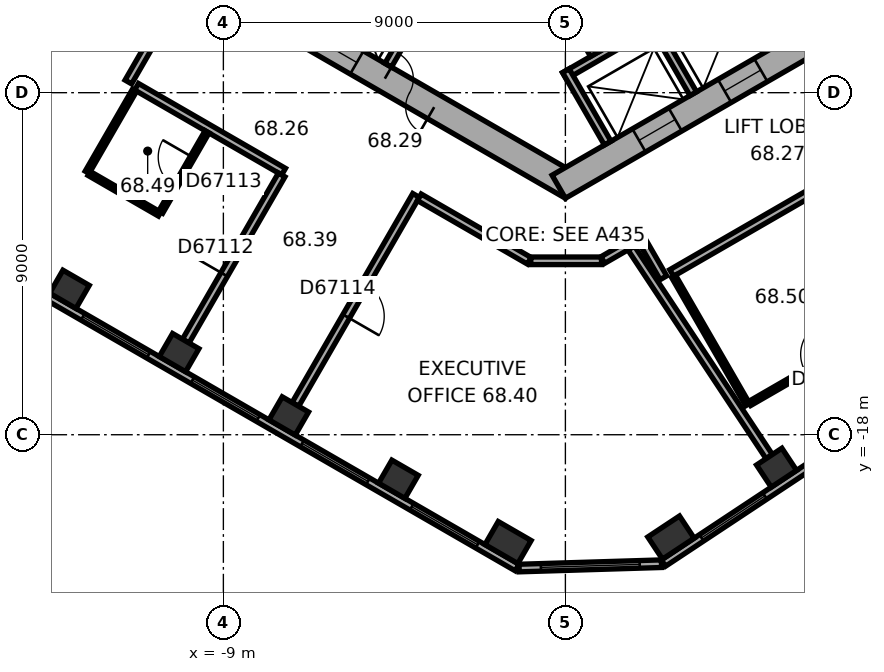
"""IFC4 building model, lengths in metres.
Left out: names, types, materials, properties, quantities, classifications, styles, units other than length and angle.
Written with IfcOpenShell. Run it as: python <this file> out.ifc"""

import sys

from ifc_helpers import new_model, si_unit, direction, frame, frame_2d, origin, origin_2d, place, context, subcontext, project, spatial, rectangle, extrude, element, fill, save


model = new_model("IFC4")
c1 = context("Model", 3, precision=1e-05, world=origin(), true_north=direction((0.0, 1.0)))
c2 = subcontext(c1, "Body", "Model", "MODEL_VIEW")
j1 = project(units=[si_unit("LENGTHUNIT", "METRE"), si_unit("PLANEANGLEUNIT", "RADIAN")], contexts=[c1])
p1 = place(None, origin())
s1 = spatial("IfcSite", under=j1, at=p1, CompositionType="ELEMENT")
p2 = place(p1, origin())
s2 = spatial("IfcBuilding", under=s1, at=p2, CompositionType="ELEMENT")
p3 = place(p2, frame((0.0, 0.0, 274.6)))
s3 = spatial("IfcBuildingStorey", under=s2, at=p3, CompositionType="ELEMENT", Elevation=274.6)
for number, where, z_axis, x_axis in (
    (1, (-13.05, -14.174, 0.0), (0.0, 0.0, 1.0), (0.866, -0.5, 0.0)),
    (2, (-10.165, -15.84, 0.0), (0.0, 0.0, 1.0), (0.866, -0.5, 0.0)),
    (3, (-7.28, -17.505, 0.0), (0.0, 0.0, 1.0), (0.866, -0.5, 0.0)),
    (4, (-4.395, -19.171, 0.0), (0.0, 0.0, 1.0), (0.866, -0.5, 0.0)),
):
    element("IfcColumn", number, at=place(p3, frame(where, z_axis=z_axis, x_axis=x_axis)), inside=s3, PredefinedType="COLUMN", context=c2, shape_type="SweptSolid", body=[
        extrude(rectangle(XDim=0.8, YDim=0.7, at=origin_2d()), origin(), (0.0, 0.0, 1.0), 3.7),
    ])
for number, where, z_axis, x_axis in (
    (5, (-1.509, -20.837, 0.0), (0.0, 0.0, 1.0), (0.866, -0.5, 0.0)),
    (6, (2.778, -20.706, 0.0), (0.0, 0.0, 1.0), (0.834, 0.552, 0.0)),
):
    element("IfcColumn", number, at=place(p3, frame(where, z_axis=z_axis, x_axis=x_axis)), inside=s3, PredefinedType="COLUMN", context=c2, shape_type="SweptSolid", body=[
        extrude(rectangle(XDim=1.0, YDim=0.7, at=origin_2d()), origin(), (0.0, 0.0, 1.0), 3.7),
    ])
p4 = place(p3, frame((5.557, -18.867, 0.0), z_axis=(0.0, 0.0, 1.0), x_axis=(0.833885822067, 0.551936985312, 0.0)))
e7 = element("IfcColumn", 7, at=p4, inside=s3, PredefinedType="COLUMN", context=c2, shape_type="SweptSolid", body=[
    extrude(rectangle(XDim=0.8, YDim=0.7, at=origin_2d()), origin(), (0.0, 0.0, 1.0), 3.7),
])
p5 = place(p3, frame((-10.025, -5.586, 0.0), z_axis=(0.0, 0.0, 1.0), x_axis=(0.866026453023, -0.499998182661, 0.0)))
e8 = element("IfcWall", 8, at=p5, inside=s3, PredefinedType="SHEAR", context=c2, shape_type="SweptSolid", body=[
    extrude(rectangle(XDim=11.778, YDim=0.7, at=frame_2d((5.889, 0.0))), origin(), (0.0, 0.0, 1.0), 3.7),
])
p6 = place(p5, frame((6.089, 0.0, 0.0)))
e9 = element("IfcOpeningElement", 9, at=p6, cuts=e8, PredefinedType="OPENING", context=c2, shape_type="SweptSolid", body=[
    extrude(rectangle(XDim=1.5, YDim=2.1, at=frame_2d((0.75, 1.05))), frame((0.0, 0.36, 0.0), z_axis=(0.0, -1.0, 0.0), x_axis=(1.0, 0.0, 0.0)), (0.0, 0.0, 1.0), 0.72),
])
p7 = place(p5, frame((1.539, 0.0, 0.0)))
e10 = element("IfcOpeningElement", 10, at=p7, cuts=e8, PredefinedType="OPENING", context=c2, shape_type="SweptSolid", body=[
    extrude(rectangle(XDim=1.1, YDim=2.1, at=frame_2d((0.55, 1.05))), frame((0.0, 0.36, 0.0), z_axis=(0.0, -1.0, 0.0), x_axis=(1.0, 0.0, 0.0)), (0.0, 0.0, 1.0), 0.72),
])
p8 = place(p5, frame((4.139, 0.0, 0.0)))
e11 = element("IfcOpeningElement", 11, at=p8, cuts=e8, PredefinedType="OPENING", context=c2, shape_type="SweptSolid", body=[
    extrude(rectangle(XDim=1.1, YDim=2.1, at=frame_2d((0.55, 1.05))), frame((0.0, 0.36, 0.0), z_axis=(0.0, -1.0, 0.0), x_axis=(1.0, 0.0, 0.0)), (0.0, 0.0, 1.0), 0.72),
])
p9 = place(p3, frame((-0.175, -11.475, 0.0), z_axis=(0.0, 0.0, 1.0), x_axis=(0.866026453023, 0.499998182661, 0.0)))
e12 = element("IfcWall", 12, at=p9, inside=s3, PredefinedType="SHEAR", context=c2, shape_type="SweptSolid", body=[
    extrude(rectangle(XDim=11.778, YDim=0.7, at=frame_2d((5.889, 0.0))), origin(), (0.0, 0.0, 1.0), 3.7),
])
p10 = place(p9, frame((2.439, 0.0, 0.0)))
e13 = element("IfcOpeningElement", 13, at=p10, cuts=e12, PredefinedType="OPENING", context=c2, shape_type="SweptSolid", body=[
    extrude(rectangle(XDim=1.1, YDim=2.1, at=frame_2d((0.55, 1.05))), frame((0.0, 0.36, 0.0), z_axis=(0.0, -1.0, 0.0), x_axis=(1.0, 0.0, 0.0)), (0.0, 0.0, 1.0), 0.72),
])
p11 = place(p9, frame((5.039, 0.0, 0.0)))
e14 = element("IfcOpeningElement", 14, at=p11, cuts=e12, PredefinedType="OPENING", context=c2, shape_type="SweptSolid", body=[
    extrude(rectangle(XDim=1.1, YDim=2.1, at=frame_2d((0.55, 1.05))), frame((0.0, 0.36, 0.0), z_axis=(0.0, -1.0, 0.0), x_axis=(1.0, 0.0, 0.0)), (0.0, 0.0, 1.0), 0.72),
])
p12 = place(p9, frame((7.639, 0.0, 0.0)))
e15 = element("IfcOpeningElement", 15, at=p12, cuts=e12, PredefinedType="OPENING", context=c2, shape_type="SweptSolid", body=[
    extrude(rectangle(XDim=1.1, YDim=2.1, at=frame_2d((0.55, 1.05))), frame((0.0, 0.36, 0.0), z_axis=(0.0, -1.0, 0.0), x_axis=(1.0, 0.0, 0.0)), (0.0, 0.0, 1.0), 0.72),
])
p13 = place(p3, frame((-16.626, -12.629, 0.0), z_axis=(0.0, 0.0, 1.0), x_axis=(0.866026460444, -0.499998169808, 0.0)))
e16 = element("IfcWall", 16, at=p13, inside=s3, PredefinedType="STANDARD", context=c2, shape_type="SweptSolid", body=[
    extrude(rectangle(XDim=17.731, YDim=0.2, at=frame_2d((8.866, 0.0))), origin(), (0.0, 0.0, 1.0), 3.7),
])
p14 = place(p13, frame((1.203, 0.0, 0.9)))
e17 = element("IfcOpeningElement", 17, at=p14, cuts=e16, PredefinedType="OPENING", context=c2, shape_type="SweptSolid", body=[
    extrude(rectangle(XDim=2.0, YDim=2.0, at=frame_2d((1.0, 1.0))), frame((0.0, 0.11, 0.0), z_axis=(0.0, -1.0, 0.0), x_axis=(1.0, 0.0, 0.0)), (0.0, 0.0, 1.0), 0.22),
])
p15 = place(p13, frame((4.535, 0.0, 0.9)))
e18 = element("IfcOpeningElement", 18, at=p15, cuts=e16, PredefinedType="OPENING", context=c2, shape_type="SweptSolid", body=[
    extrude(rectangle(XDim=2.0, YDim=2.0, at=frame_2d((1.0, 1.0))), frame((0.0, 0.11, 0.0), z_axis=(0.0, -1.0, 0.0), x_axis=(1.0, 0.0, 0.0)), (0.0, 0.0, 1.0), 0.22),
])
p16 = place(p13, frame((7.867, 0.0, 0.9)))
e19 = element("IfcOpeningElement", 19, at=p16, cuts=e16, PredefinedType="OPENING", context=c2, shape_type="SweptSolid", body=[
    extrude(rectangle(XDim=2.0, YDim=2.0, at=frame_2d((1.0, 1.0))), frame((0.0, 0.11, 0.0), z_axis=(0.0, -1.0, 0.0), x_axis=(1.0, 0.0, 0.0)), (0.0, 0.0, 1.0), 0.22),
])
p17 = place(p13, frame((11.198, 0.0, 0.9)))
e20 = element("IfcOpeningElement", 20, at=p17, cuts=e16, PredefinedType="OPENING", context=c2, shape_type="SweptSolid", body=[
    extrude(rectangle(XDim=2.0, YDim=2.0, at=frame_2d((1.0, 1.0))), frame((0.0, 0.11, 0.0), z_axis=(0.0, -1.0, 0.0), x_axis=(1.0, 0.0, 0.0)), (0.0, 0.0, 1.0), 0.22),
])
p18 = place(p13, frame((14.53, 0.0, 0.9)))
e21 = element("IfcOpeningElement", 21, at=p18, cuts=e16, PredefinedType="OPENING", context=c2, shape_type="SweptSolid", body=[
    extrude(rectangle(XDim=2.0, YDim=2.0, at=frame_2d((1.0, 1.0))), frame((0.0, 0.11, 0.0), z_axis=(0.0, -1.0, 0.0), x_axis=(1.0, 0.0, 0.0)), (0.0, 0.0, 1.0), 0.22),
])
p19 = place(p3, frame((-1.217, -21.508, 0.0), z_axis=(0.0, 0.0, 1.0), x_axis=(0.99953295295, 0.030559384285, 0.0)))
e22 = element("IfcWall", 22, at=p19, inside=s3, PredefinedType="STANDARD", context=c2, shape_type="SweptSolid", body=[
    extrude(rectangle(XDim=3.747, YDim=0.2, at=frame_2d((1.874, 0.0))), origin(), (0.0, 0.0, 1.0), 3.7),
])
p20 = place(p19, frame((0.573, 0.0, 0.9)))
e23 = element("IfcOpeningElement", 23, at=p20, cuts=e22, PredefinedType="OPENING", context=c2, shape_type="SweptSolid", body=[
    extrude(rectangle(XDim=2.6, YDim=2.0, at=frame_2d((1.3, 1.0))), frame((0.0, 0.11, 0.0), z_axis=(0.0, -1.0, 0.0), x_axis=(1.0, 0.0, 0.0)), (0.0, 0.0, 1.0), 0.22),
])
p21 = place(p3, frame((2.58, -21.377, 0.0), z_axis=(0.0, 0.0, 1.0), x_axis=(0.833888592176, 0.551932800112, 0.0)))
e24 = element("IfcWall", 24, at=p21, inside=s3, PredefinedType="STANDARD", context=c2, shape_type="SweptSolid", body=[
    extrude(rectangle(XDim=17.731, YDim=0.2, at=frame_2d((8.866, 0.0))), origin(), (0.0, 0.0, 1.0), 3.7),
])
p22 = place(p21, frame((1.202, 0.0, 0.9)))
e25 = element("IfcOpeningElement", 25, at=p22, cuts=e24, PredefinedType="OPENING", context=c2, shape_type="SweptSolid", body=[
    extrude(rectangle(XDim=2.0, YDim=2.0, at=frame_2d((1.0, 1.0))), frame((0.0, 0.11, 0.0), z_axis=(0.0, -1.0, 0.0), x_axis=(1.0, 0.0, 0.0)), (0.0, 0.0, 1.0), 0.22),
])
p23 = place(p21, frame((4.533, 0.0, 0.9)))
e26 = element("IfcOpeningElement", 26, at=p23, cuts=e24, PredefinedType="OPENING", context=c2, shape_type="SweptSolid", body=[
    extrude(rectangle(XDim=2.0, YDim=2.0, at=frame_2d((1.0, 1.0))), frame((0.0, 0.11, 0.0), z_axis=(0.0, -1.0, 0.0), x_axis=(1.0, 0.0, 0.0)), (0.0, 0.0, 1.0), 0.22),
])
p24 = place(p21, frame((7.865, 0.0, 0.9)))
e27 = element("IfcOpeningElement", 27, at=p24, cuts=e24, PredefinedType="OPENING", context=c2, shape_type="SweptSolid", body=[
    extrude(rectangle(XDim=2.0, YDim=2.0, at=frame_2d((1.0, 1.0))), frame((0.0, 0.11, 0.0), z_axis=(0.0, -1.0, 0.0), x_axis=(1.0, 0.0, 0.0)), (0.0, 0.0, 1.0), 0.22),
])
p25 = place(p21, frame((11.197, 0.0, 0.9)))
e28 = element("IfcOpeningElement", 28, at=p25, cuts=e24, PredefinedType="OPENING", context=c2, shape_type="SweptSolid", body=[
    extrude(rectangle(XDim=2.0, YDim=2.0, at=frame_2d((1.0, 1.0))), frame((0.0, 0.11, 0.0), z_axis=(0.0, -1.0, 0.0), x_axis=(1.0, 0.0, 0.0)), (0.0, 0.0, 1.0), 0.22),
])
p26 = place(p21, frame((14.528, 0.0, 0.9)))
e29 = element("IfcOpeningElement", 29, at=p26, cuts=e24, PredefinedType="OPENING", context=c2, shape_type="SweptSolid", body=[
    extrude(rectangle(XDim=2.0, YDim=2.0, at=frame_2d((1.0, 1.0))), frame((0.0, 0.11, 0.0), z_axis=(0.0, -1.0, 0.0), x_axis=(1.0, 0.0, 0.0)), (0.0, 0.0, 1.0), 0.22),
])
p27 = place(p3, frame((-3.563, -6.372, 0.0), z_axis=(0.0, 0.0, 1.0), x_axis=(-0.499994660107, -0.866028486751, 0.0)))
e30 = element("IfcWall", 30, at=p27, inside=s3, PredefinedType="PARTITIONING", context=c2, shape_type="SweptSolid", body=[
    extrude(rectangle(XDim=2.2, YDim=0.2, at=frame_2d((1.1, 0.0))), origin(), (0.0, 0.0, 1.0), 3.35),
])
p28 = place(p3, frame((-0.024, -8.559, 0.0), z_axis=(0.0, 0.0, 1.0), x_axis=(0.866026010844, 0.49999894854, 0.0)))
e31 = element("IfcWall", 31, at=p28, inside=s3, PredefinedType="PARTITIONING", context=c2, shape_type="SweptSolid", body=[
    extrude(rectangle(XDim=8.0, YDim=0.2, at=frame_2d((4.0, 0.0))), origin(), (0.0, 0.0, 1.0), 3.35),
])
for number, where, z_axis, x_axis in (
    (32, (0.013, -8.422, 0.0), (0.0, 0.0, 1.0), (0.5, -0.866, 0.0)),
    (33, (2.264, -7.122, 0.0), (0.0, 0.0, 1.0), (0.5, -0.866, 0.0)),
):
    element("IfcWall", number, at=place(p3, frame(where, z_axis=z_axis, x_axis=x_axis)), inside=s3, PredefinedType="PARTITIONING", context=c2, shape_type="SweptSolid", body=[
        extrude(rectangle(XDim=2.2, YDim=0.2, at=frame_2d((1.1, 0.0))), origin(), (0.0, 0.0, 1.0), 3.35),
    ])
p29 = place(p3, frame((-1.558, -3.902, 0.0), z_axis=(0.0, 0.0, 1.0), x_axis=(0.499977259774, -0.866038532462, 0.0)))
e34 = element("IfcWall", 34, at=p29, inside=s3, PredefinedType="SHEAR", context=c2, shape_type="SweptSolid", body=[
    extrude(rectangle(XDim=4.7, YDim=0.3, at=frame_2d((2.35, 0.0))), origin(), (0.0, 0.0, 1.0), 3.35),
])
p30 = place(p29, frame((0.8, 0.0, 0.0)))
e35 = element("IfcOpeningElement", 35, at=p30, cuts=e34, PredefinedType="OPENING", context=c2, shape_type="SweptSolid", body=[
    extrude(rectangle(XDim=1.2, YDim=2.1, at=frame_2d((0.6, 1.05))), frame((0.0, 0.16, 0.0), z_axis=(0.0, -1.0, 0.0), x_axis=(1.0, 0.0, 0.0)), (0.0, 0.0, 1.0), 0.32),
])
p31 = place(p3, frame((-12.585, -11.095, 0.0), z_axis=(0.0, 0.0, 1.0), x_axis=(0.500004234368, 0.866022959057, 0.0)))
e36 = element("IfcWall", 36, at=p31, inside=s3, PredefinedType="PARTITIONING", context=c2, shape_type="SweptSolid", body=[
    extrude(rectangle(XDim=2.5, YDim=0.12, at=frame_2d((1.25, 0.0))), origin(), (0.0, 0.0, 1.0), 3.35),
])
p32 = place(p3, frame((-11.285, -8.844, 0.0), z_axis=(0.0, 0.0, 1.0), x_axis=(0.866021785011, -0.500006267848, 0.0)))
e37 = element("IfcWall", 37, at=p32, inside=s3, PredefinedType="PARTITIONING", context=c2, shape_type="SweptSolid", body=[
    extrude(rectangle(XDim=4.468, YDim=0.2, at=frame_2d((2.234, 0.0))), origin(), (0.0, 0.0, 1.0), 3.35),
])
p33 = place(p3, frame((-10.901, -7.678, 0.0), z_axis=(0.0, 0.0, 1.0), x_axis=(-0.500074377092, -0.865982457891, 0.0)))
e38 = element("IfcWall", 38, at=p33, inside=s3, PredefinedType="PARTITIONING", context=c2, shape_type="SweptSolid", body=[
    extrude(rectangle(XDim=1.201, YDim=0.2, at=frame_2d((0.601, 0.0))), origin(), (0.0, 0.0, 1.0), 3.35),
])
p34 = place(p3, frame((-10.679, -12.195, 0.0), z_axis=(0.0, 0.0, 1.0), x_axis=(-0.866037418504, 0.499979189318, 0.0)))
e39 = element("IfcWall", 39, at=p34, inside=s3, PredefinedType="PARTITIONING", context=c2, shape_type="SweptSolid", body=[
    extrude(rectangle(XDim=2.14, YDim=0.12, at=frame_2d((1.07, 0.0))), origin(), (0.0, 0.0, 1.0), 3.35),
])
p35 = place(p3, frame((-9.99, -15.537, 0.0), z_axis=(0.0, 0.0, 1.0), x_axis=(0.499966611936, 0.866044679534, 0.0)))
e40 = element("IfcWall", 40, at=p35, inside=s3, PredefinedType="PARTITIONING", context=c2, shape_type="SweptSolid", body=[
    extrude(rectangle(XDim=5.049, YDim=0.2, at=frame_2d((2.524, 0.0))), origin(), (0.0, 0.0, 1.0), 2.65),
])
p36 = place(p35, frame((2.024, 0.0, 0.0)))
e41 = element("IfcOpeningElement", 41, at=p36, cuts=e40, PredefinedType="OPENING", context=c2, shape_type="SweptSolid", body=[
    extrude(rectangle(XDim=1.0, YDim=2.1, at=frame_2d((0.5, 1.05))), frame((0.0, 0.11, 0.0), z_axis=(0.0, -1.0, 0.0), x_axis=(1.0, 0.0, 0.0)), (0.0, 0.0, 1.0), 0.22),
])
p37 = place(p3, frame((-9.429, -10.03, 0.0), z_axis=(0.0, 0.0, 1.0), x_axis=(-0.500034220881, -0.866005645448, 0.0)))
e42 = element("IfcWall", 42, at=p37, inside=s3, PredefinedType="PARTITIONING", context=c2, shape_type="SweptSolid", body=[
    extrude(rectangle(XDim=2.44, YDim=0.12, at=frame_2d((1.22, 0.0))), origin(), (0.0, 0.0, 1.0), 3.35),
])
p38 = place(p37, frame((0.77, 0.0, 0.0)))
e43 = element("IfcOpeningElement", 43, at=p38, cuts=e42, PredefinedType="OPENING", context=c2, shape_type="SweptSolid", body=[
    extrude(rectangle(XDim=0.9, YDim=2.1, at=frame_2d((0.45, 1.05))), frame((0.0, 0.07, 0.0), z_axis=(0.0, -1.0, 0.0), x_axis=(1.0, 0.0, 0.0)), (0.0, 0.0, 1.0), 0.14),
])
p39 = place(p3, frame((-7.105, -17.202, 0.0), z_axis=(0.0, 0.0, 1.0), x_axis=(0.499988692146, 0.866031932279, 0.0)))
e44 = element("IfcWall", 44, at=p39, inside=s3, PredefinedType="PARTITIONING", context=c2, shape_type="SweptSolid", body=[
    extrude(rectangle(XDim=6.35, YDim=0.2, at=frame_2d((3.175, 0.0))), origin(), (0.0, 0.0, 1.0), 3.35),
])
p40 = place(p39, frame((2.675, 0.0, 0.0)))
e45 = element("IfcOpeningElement", 45, at=p40, cuts=e44, PredefinedType="OPENING", context=c2, shape_type="SweptSolid", body=[
    extrude(rectangle(XDim=1.0, YDim=2.1, at=frame_2d((0.5, 1.05))), frame((0.0, 0.11, 0.0), z_axis=(0.0, -1.0, 0.0), x_axis=(1.0, 0.0, 0.0)), (0.0, 0.0, 1.0), 0.22),
])
p41 = place(p3, frame((-3.843, -11.753, 0.0), z_axis=(0.0, 0.0, 1.0), x_axis=(0.866031037473, -0.499990242038, 0.0)))
e46 = element("IfcWall", 46, at=p41, inside=s3, PredefinedType="PARTITIONING", context=c2, shape_type="SweptSolid", body=[
    extrude(rectangle(XDim=3.341, YDim=0.2, at=frame_2d((1.67, 0.0))), origin(), (0.0, 0.0, 1.0), 3.35),
])
p42 = place(p3, frame((-0.91, -13.423, 0.0), z_axis=(0.0, 0.0, 1.0), x_axis=(1.0, 0.0, 0.0)))
e47 = element("IfcWall", 47, at=p42, inside=s3, PredefinedType="PARTITIONING", context=c2, shape_type="SweptSolid", body=[
    extrude(rectangle(XDim=1.86, YDim=0.2, at=frame_2d((0.93, 0.0))), origin(), (0.0, 0.0, 1.0), 3.35),
])
p43 = place(p3, frame((0.985, -13.403, 0.0), z_axis=(0.0, 0.0, 1.0), x_axis=(0.866032814021, 0.499987164874, 0.0)))
e48 = element("IfcWall", 48, at=p43, inside=s3, PredefinedType="PARTITIONING", context=c2, shape_type="SweptSolid", body=[
    extrude(rectangle(XDim=0.798, YDim=0.2, at=frame_2d((0.399, 0.0))), origin(), (0.0, 0.0, 1.0), 3.35),
])
p44 = place(p3, frame((1.979, -12.829, 0.0), z_axis=(0.0, 0.0, 1.0), x_axis=(0.500074377092, -0.865982457891, 0.0)))
e49 = element("IfcWall", 49, at=p44, inside=s3, PredefinedType="PARTITIONING", context=c2, shape_type="SweptSolid", body=[
    extrude(rectangle(XDim=1.201, YDim=0.2, at=frame_2d((0.601, 0.0))), origin(), (0.0, 0.0, 1.0), 3.35),
])
p45 = place(p3, frame((2.796, -13.744, 0.0), z_axis=(0.0, 0.0, 1.0), x_axis=(0.866018331238, 0.50001224981, 0.0)))
e50 = element("IfcWall", 50, at=p45, inside=s3, PredefinedType="PARTITIONING", context=c2, shape_type="SweptSolid", body=[
    extrude(rectangle(XDim=4.4, YDim=0.2, at=frame_2d((2.2, 0.0))), origin(), (0.0, 0.0, 1.0), 3.35),
])
p46 = place(p3, frame((4.796, -17.208, 0.0), z_axis=(0.0, 0.0, 1.0), x_axis=(-0.500043961785, 0.866000020948, 0.0)))
e51 = element("IfcWall", 51, at=p46, inside=s3, PredefinedType="PARTITIONING", context=c2, shape_type="SweptSolid", body=[
    extrude(rectangle(XDim=3.9, YDim=0.12, at=frame_2d((1.95, 0.0))), origin(), (0.0, 0.0, 1.0), 3.35),
])
p47 = place(p3, frame((5.364, -18.575, 0.0), z_axis=(0.0, 0.0, 1.0), x_axis=(-0.55195757761, 0.833872191957, 0.0)))
e52 = element("IfcWall", 52, at=p47, inside=s3, PredefinedType="PARTITIONING", context=c2, shape_type="SweptSolid", body=[
    extrude(rectangle(XDim=6.581, YDim=0.2, at=frame_2d((3.291, 0.0))), origin(), (0.0, 0.0, 1.0), 3.35),
])
p48 = place(p3, frame((8.554, -15.039, 0.0), z_axis=(0.0, 0.0, 1.0), x_axis=(-0.865994635417, -0.500053288589, 0.0)))
e53 = element("IfcWall", 53, at=p48, inside=s3, PredefinedType="PARTITIONING", context=c2, shape_type="SweptSolid", body=[
    extrude(rectangle(XDim=4.28, YDim=0.12, at=frame_2d((2.14, 0.0))), origin(), (0.0, 0.0, 1.0), 3.35),
])
p49 = place(p48, frame((1.69, 0.0, 0.0)))
e54 = element("IfcOpeningElement", 54, at=p49, cuts=e53, PredefinedType="OPENING", context=c2, shape_type="SweptSolid", body=[
    extrude(rectangle(XDim=0.9, YDim=2.1, at=frame_2d((0.45, 1.05))), frame((0.0, 0.07, 0.0), z_axis=(0.0, -1.0, 0.0), x_axis=(1.0, 0.0, 0.0)), (0.0, 0.0, 1.0), 0.14),
])
p50 = place(p15, origin())
e55 = element("IfcWindow", 55, at=p50, inside=s3, PartitioningType="SINGLE_PANEL", PredefinedType="WINDOW", context=c2, shape_type="SweptSolid", body=[
    extrude(rectangle(XDim=2.0, YDim=2.0, at=frame_2d((1.0, 1.0))), frame((0.0, 0.03, 0.0), z_axis=(0.0, -1.0, 0.0), x_axis=(1.0, 0.0, 0.0)), (0.0, 0.0, 1.0), 0.06),
])
fill(e18, e55)
p51 = place(p16, origin())
e56 = element("IfcWindow", 56, at=p51, inside=s3, PartitioningType="SINGLE_PANEL", PredefinedType="WINDOW", context=c2, shape_type="SweptSolid", body=[
    extrude(rectangle(XDim=2.0, YDim=2.0, at=frame_2d((1.0, 1.0))), frame((0.0, 0.03, 0.0), z_axis=(0.0, -1.0, 0.0), x_axis=(1.0, 0.0, 0.0)), (0.0, 0.0, 1.0), 0.06),
])
fill(e19, e56)
p52 = place(p17, origin())
e57 = element("IfcWindow", 57, at=p52, inside=s3, PartitioningType="SINGLE_PANEL", PredefinedType="WINDOW", context=c2, shape_type="SweptSolid", body=[
    extrude(rectangle(XDim=2.0, YDim=2.0, at=frame_2d((1.0, 1.0))), frame((0.0, 0.03, 0.0), z_axis=(0.0, -1.0, 0.0), x_axis=(1.0, 0.0, 0.0)), (0.0, 0.0, 1.0), 0.06),
])
fill(e20, e57)
p53 = place(p18, origin())
e58 = element("IfcWindow", 58, at=p53, inside=s3, PartitioningType="SINGLE_PANEL", PredefinedType="WINDOW", context=c2, shape_type="SweptSolid", body=[
    extrude(rectangle(XDim=2.0, YDim=2.0, at=frame_2d((1.0, 1.0))), frame((0.0, 0.03, 0.0), z_axis=(0.0, -1.0, 0.0), x_axis=(1.0, 0.0, 0.0)), (0.0, 0.0, 1.0), 0.06),
])
fill(e21, e58)
p54 = place(p20, origin())
e59 = element("IfcWindow", 59, at=p54, inside=s3, PartitioningType="SINGLE_PANEL", PredefinedType="WINDOW", context=c2, shape_type="SweptSolid", body=[
    extrude(rectangle(XDim=2.6, YDim=2.0, at=frame_2d((1.3, 1.0))), frame((0.0, 0.03, 0.0), z_axis=(0.0, -1.0, 0.0), x_axis=(1.0, 0.0, 0.0)), (0.0, 0.0, 1.0), 0.06),
])
fill(e23, e59)
p55 = place(p22, origin())
e60 = element("IfcWindow", 60, at=p55, inside=s3, PartitioningType="SINGLE_PANEL", PredefinedType="WINDOW", context=c2, shape_type="SweptSolid", body=[
    extrude(rectangle(XDim=2.0, YDim=2.0, at=frame_2d((1.0, 1.0))), frame((0.0, 0.03, 0.0), z_axis=(0.0, -1.0, 0.0), x_axis=(1.0, 0.0, 0.0)), (0.0, 0.0, 1.0), 0.06),
])
fill(e25, e60)
p56 = place(p6, origin())
e61 = element("IfcDoor", 61, at=p56, inside=s3, OperationType="DOUBLE_DOOR_SINGLE_SWING", PredefinedType="DOOR", context=c2, shape_type="SweptSolid", body=[
    extrude(rectangle(XDim=1.5, YDim=2.1, at=frame_2d((0.75, 1.05))), frame((0.0, 0.025, 0.0), z_axis=(0.0, -1.0, 0.0), x_axis=(1.0, 0.0, 0.0)), (0.0, 0.0, 1.0), 0.05),
])
fill(e9, e61)
p57 = place(p8, origin())
e62 = element("IfcDoor", 62, at=p57, inside=s3, OperationType="DOUBLE_DOOR_SLIDING", PredefinedType="DOOR", context=c2, shape_type="SweptSolid", body=[
    extrude(rectangle(XDim=1.1, YDim=2.1, at=frame_2d((0.55, 1.05))), frame((0.0, 0.025, 0.0), z_axis=(0.0, -1.0, 0.0), x_axis=(1.0, 0.0, 0.0)), (0.0, 0.0, 1.0), 0.05),
])
fill(e11, e62)
p58 = place(p10, origin())
e63 = element("IfcDoor", 63, at=p58, inside=s3, OperationType="DOUBLE_DOOR_SLIDING", PredefinedType="DOOR", context=c2, shape_type="SweptSolid", body=[
    extrude(rectangle(XDim=1.1, YDim=2.1, at=frame_2d((0.55, 1.05))), frame((0.0, 0.025, 0.0), z_axis=(0.0, -1.0, 0.0), x_axis=(1.0, 0.0, 0.0)), (0.0, 0.0, 1.0), 0.05),
])
fill(e13, e63)
p59 = place(p11, origin())
e64 = element("IfcDoor", 64, at=p59, inside=s3, OperationType="DOUBLE_DOOR_SLIDING", PredefinedType="DOOR", context=c2, shape_type="SweptSolid", body=[
    extrude(rectangle(XDim=1.1, YDim=2.1, at=frame_2d((0.55, 1.05))), frame((0.0, 0.025, 0.0), z_axis=(0.0, -1.0, 0.0), x_axis=(1.0, 0.0, 0.0)), (0.0, 0.0, 1.0), 0.05),
])
fill(e14, e64)
p60 = place(p36, origin())
e65 = element("IfcDoor", 65, at=p60, inside=s3, OperationType="SINGLE_SWING_LEFT", PredefinedType="DOOR", context=c2, shape_type="SweptSolid", body=[
    extrude(rectangle(XDim=1.0, YDim=2.1, at=frame_2d((0.5, 1.05))), frame((0.0, 0.025, 0.0), z_axis=(0.0, -1.0, 0.0), x_axis=(1.0, 0.0, 0.0)), (0.0, 0.0, 1.0), 0.05),
])
fill(e41, e65)
p61 = place(p38, origin())
e66 = element("IfcDoor", 66, at=p61, inside=s3, OperationType="SINGLE_SWING_LEFT", PredefinedType="DOOR", context=c2, shape_type="SweptSolid", body=[
    extrude(rectangle(XDim=0.9, YDim=2.1, at=frame_2d((0.45, 1.05))), frame((0.0, 0.025, 0.0), z_axis=(0.0, -1.0, 0.0), x_axis=(1.0, 0.0, 0.0)), (0.0, 0.0, 1.0), 0.05),
])
fill(e43, e66)
p62 = place(p40, origin())
e67 = element("IfcDoor", 67, at=p62, inside=s3, OperationType="SINGLE_SWING_LEFT", PredefinedType="DOOR", context=c2, shape_type="SweptSolid", body=[
    extrude(rectangle(XDim=1.0, YDim=2.1, at=frame_2d((0.5, 1.05))), frame((0.0, 0.025, 0.0), z_axis=(0.0, -1.0, 0.0), x_axis=(1.0, 0.0, 0.0)), (0.0, 0.0, 1.0), 0.05),
])
fill(e45, e67)
save(model, sys.argv[1])
